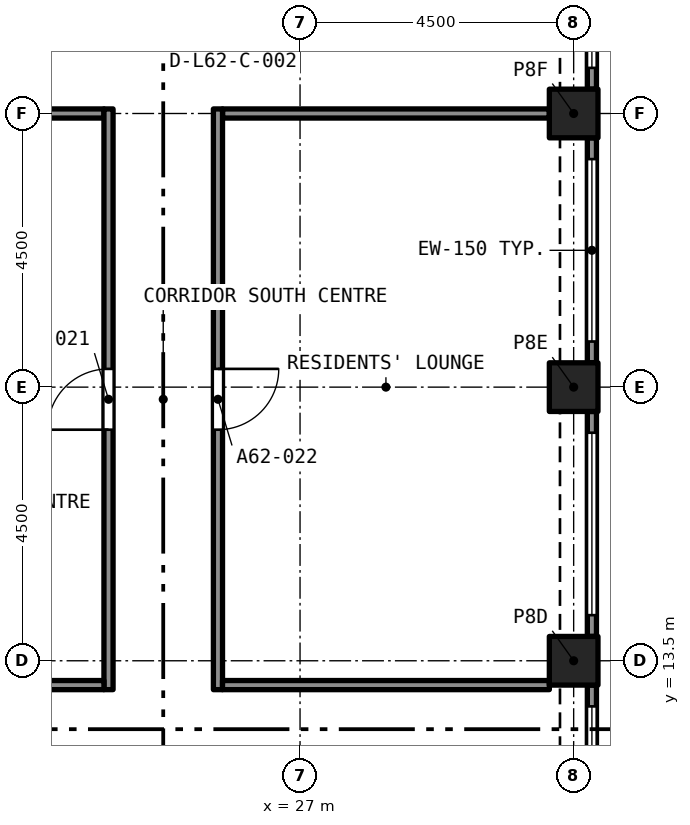
"""IFC4 building model, lengths in metres.
Left out: names, types, materials, properties, quantities, classifications, styles, units other than length and angle.
Written with IfcOpenShell. Run it as: python <this file> out.ifc"""

import sys

from ifc_helpers import new_model, si_unit, direction, frame, frame_2d, origin, origin_2d, place, context, subcontext, project, spatial, rectangle, extrude, element, fill, save


model = new_model("IFC4")
c1 = context("Model", 3, precision=1e-05, world=origin(), true_north=direction((0.0, 1.0)))
c2 = subcontext(c1, "Body", "Model", "MODEL_VIEW")
j1 = project(units=[si_unit("LENGTHUNIT", "METRE"), si_unit("PLANEANGLEUNIT", "RADIAN")], contexts=[c1])
p1 = place(None, origin())
s1 = spatial("IfcSite", under=j1, at=p1, CompositionType="ELEMENT")
p2 = place(p1, origin())
s2 = spatial("IfcBuilding", under=s1, at=p2, CompositionType="ELEMENT")
p3 = place(p2, frame((0.0, 0.0, 222.895)))
s3 = spatial("IfcBuildingStorey", under=s2, at=p3, CompositionType="ELEMENT", Elevation=222.895)
for number, where, z_axis, x_axis in (
    (1, (31.5, 13.5, 0.0), (0.0, 0.0, 1.0), (1.0, 0.0, 0.0)),
    (2, (31.5, 18.0, 0.0), (0.0, 0.0, 1.0), (1.0, 0.0, 0.0)),
    (3, (31.5, 22.5, 0.0), (0.0, 0.0, 1.0), (1.0, 0.0, 0.0)),
):
    element("IfcColumn", number, at=place(p3, frame(where, z_axis=z_axis, x_axis=x_axis)), inside=s3, PredefinedType="COLUMN", context=c2, shape_type="SweptSolid", body=[
        extrude(rectangle(XDim=0.8, YDim=0.8, at=origin_2d()), origin(), (0.0, 0.0, 1.0), 3.2),
    ])
p4 = place(p3, frame((31.8, 13.1, 0.0), z_axis=(0.0, 0.0, 1.0), x_axis=(0.0, -1.0, 0.0)))
e4 = element("IfcWall", 4, at=p4, inside=s3, PredefinedType="SOLIDWALL", context=c2, shape_type="SweptSolid", body=[
    extrude(rectangle(XDim=3.7, YDim=0.15, at=frame_2d((1.85, 0.0))), origin(), (0.0, 0.0, 1.0), 3.2),
])
p5 = place(p4, frame((0.35, 0.0, 0.45)))
e5 = element("IfcOpeningElement", 5, at=p5, cuts=e4, PredefinedType="OPENING", context=c2, shape_type="SweptSolid", body=[
    extrude(rectangle(XDim=3.0, YDim=1.95, at=frame_2d((1.5, 0.975))), frame((0.0, 0.085, 0.0), z_axis=(0.0, -1.0, 0.0), x_axis=(1.0, 0.0, 0.0)), (0.0, 0.0, 1.0), 0.17),
])
p6 = place(p3, frame((31.8, 17.6, 0.0), z_axis=(0.0, 0.0, 1.0), x_axis=(0.0, -1.0, 0.0)))
e6 = element("IfcWall", 6, at=p6, inside=s3, PredefinedType="SOLIDWALL", context=c2, shape_type="SweptSolid", body=[
    extrude(rectangle(XDim=3.7, YDim=0.15, at=frame_2d((1.85, 0.0))), origin(), (0.0, 0.0, 1.0), 3.2),
])
p7 = place(p6, frame((0.35, 0.0, 0.45)))
e7 = element("IfcOpeningElement", 7, at=p7, cuts=e6, PredefinedType="OPENING", context=c2, shape_type="SweptSolid", body=[
    extrude(rectangle(XDim=3.0, YDim=1.95, at=frame_2d((1.5, 0.975))), frame((0.0, 0.085, 0.0), z_axis=(0.0, -1.0, 0.0), x_axis=(1.0, 0.0, 0.0)), (0.0, 0.0, 1.0), 0.17),
])
p8 = place(p3, frame((31.8, 22.1, 0.0), z_axis=(0.0, 0.0, 1.0), x_axis=(0.0, -1.0, 0.0)))
e8 = element("IfcWall", 8, at=p8, inside=s3, PredefinedType="SOLIDWALL", context=c2, shape_type="SweptSolid", body=[
    extrude(rectangle(XDim=3.7, YDim=0.15, at=frame_2d((1.85, 0.0))), origin(), (0.0, 0.0, 1.0), 3.2),
])
p9 = place(p8, frame((0.35, 0.0, 0.45)))
e9 = element("IfcOpeningElement", 9, at=p9, cuts=e8, PredefinedType="OPENING", context=c2, shape_type="SweptSolid", body=[
    extrude(rectangle(XDim=3.0, YDim=1.95, at=frame_2d((1.5, 0.975))), frame((0.0, 0.085, 0.0), z_axis=(0.0, -1.0, 0.0), x_axis=(1.0, 0.0, 0.0)), (0.0, 0.0, 1.0), 0.17),
])
p10 = place(p3, frame((31.8, 26.6, 0.0), z_axis=(0.0, 0.0, 1.0), x_axis=(0.0, -1.0, 0.0)))
e10 = element("IfcWall", 10, at=p10, inside=s3, PredefinedType="SOLIDWALL", context=c2, shape_type="SweptSolid", body=[
    extrude(rectangle(XDim=3.7, YDim=0.15, at=frame_2d((1.85, 0.0))), origin(), (0.0, 0.0, 1.0), 3.2),
])
p11 = place(p10, frame((0.35, 0.0, 0.45)))
e11 = element("IfcOpeningElement", 11, at=p11, cuts=e10, PredefinedType="OPENING", context=c2, shape_type="SweptSolid", body=[
    extrude(rectangle(XDim=3.0, YDim=1.95, at=frame_2d((1.5, 0.975))), frame((0.0, 0.085, 0.0), z_axis=(0.0, -1.0, 0.0), x_axis=(1.0, 0.0, 0.0)), (0.0, 0.0, 1.0), 0.17),
])
for number, where, z_axis, x_axis in (
    (12, (18.4, 22.5, 0.0), (0.0, 0.0, 1.0), (1.0, 0.0, 0.0)),
    (13, (25.725, 22.5, 0.0), (0.0, 0.0, 1.0), (1.0, 0.0, 0.0)),
):
    element("IfcWall", number, at=place(p3, frame(where, z_axis=z_axis, x_axis=x_axis)), inside=s3, PredefinedType="PARTITIONING", context=c2, shape_type="SweptSolid", body=[
        extrude(rectangle(XDim=5.375, YDim=0.15, at=frame_2d((2.688, 0.0))), origin(), (0.0, 0.0, 1.0), 2.75),
    ])
p12 = place(p3, frame((23.85, 13.025, 0.0), z_axis=(0.0, 0.0, 1.0), x_axis=(0.0, 1.0, 0.0)))
e14 = element("IfcWall", 14, at=p12, inside=s3, PredefinedType="PARTITIONING", context=c2, shape_type="SweptSolid", body=[
    extrude(rectangle(XDim=9.55, YDim=0.15, at=frame_2d((4.775, 0.0))), origin(), (0.0, 0.0, 1.0), 2.75),
])
p13 = place(p12, frame((4.275, 0.0, 0.0)))
e15 = element("IfcOpeningElement", 15, at=p13, cuts=e14, PredefinedType="OPENING", context=c2, shape_type="SweptSolid", body=[
    extrude(rectangle(XDim=1.0, YDim=2.1, at=frame_2d((0.5, 1.05))), frame((0.0, 0.085, 0.0), z_axis=(0.0, -1.0, 0.0), x_axis=(1.0, 0.0, 0.0)), (0.0, 0.0, 1.0), 0.17),
])
p14 = place(p3, frame((25.65, 22.575, 0.0), z_axis=(0.0, 0.0, 1.0), x_axis=(0.0, -1.0, 0.0)))
e16 = element("IfcWall", 16, at=p14, inside=s3, PredefinedType="PARTITIONING", context=c2, shape_type="SweptSolid", body=[
    extrude(rectangle(XDim=9.55, YDim=0.15, at=frame_2d((4.775, 0.0))), origin(), (0.0, 0.0, 1.0), 2.75),
])
p15 = place(p14, frame((4.275, 0.0, 0.0)))
e17 = element("IfcOpeningElement", 17, at=p15, cuts=e16, PredefinedType="OPENING", context=c2, shape_type="SweptSolid", body=[
    extrude(rectangle(XDim=1.0, YDim=2.1, at=frame_2d((0.5, 1.05))), frame((0.0, 0.085, 0.0), z_axis=(0.0, -1.0, 0.0), x_axis=(1.0, 0.0, 0.0)), (0.0, 0.0, 1.0), 0.17),
])
for number, where, z_axis, x_axis in (
    (18, (18.4, 13.1, 0.0), (0.0, 0.0, 1.0), (1.0, 0.0, 0.0)),
    (19, (25.725, 13.1, 0.0), (0.0, 0.0, 1.0), (1.0, 0.0, 0.0)),
):
    element("IfcWall", number, at=place(p3, frame(where, z_axis=z_axis, x_axis=x_axis)), inside=s3, PredefinedType="PARTITIONING", context=c2, shape_type="SweptSolid", body=[
        extrude(rectangle(XDim=5.375, YDim=0.15, at=frame_2d((2.688, 0.0))), origin(), (0.0, 0.0, 1.0), 2.75),
    ])
p16 = place(p5, origin())
e20 = element("IfcWindow", 20, at=p16, inside=s3, PartitioningType="SINGLE_PANEL", PredefinedType="WINDOW", context=c2, shape_type="SweptSolid", body=[
    extrude(rectangle(XDim=3.0, YDim=1.95, at=frame_2d((1.5, 0.975))), frame((0.0, 0.03, 0.0), z_axis=(0.0, -1.0, 0.0), x_axis=(1.0, 0.0, 0.0)), (0.0, 0.0, 1.0), 0.06),
])
fill(e5, e20)
p17 = place(p7, origin())
e21 = element("IfcWindow", 21, at=p17, inside=s3, PartitioningType="SINGLE_PANEL", PredefinedType="WINDOW", context=c2, shape_type="SweptSolid", body=[
    extrude(rectangle(XDim=3.0, YDim=1.95, at=frame_2d((1.5, 0.975))), frame((0.0, 0.03, 0.0), z_axis=(0.0, -1.0, 0.0), x_axis=(1.0, 0.0, 0.0)), (0.0, 0.0, 1.0), 0.06),
])
fill(e7, e21)
p18 = place(p9, origin())
e22 = element("IfcWindow", 22, at=p18, inside=s3, PartitioningType="SINGLE_PANEL", PredefinedType="WINDOW", context=c2, shape_type="SweptSolid", body=[
    extrude(rectangle(XDim=3.0, YDim=1.95, at=frame_2d((1.5, 0.975))), frame((0.0, 0.03, 0.0), z_axis=(0.0, -1.0, 0.0), x_axis=(1.0, 0.0, 0.0)), (0.0, 0.0, 1.0), 0.06),
])
fill(e9, e22)
p19 = place(p11, origin())
e23 = element("IfcWindow", 23, at=p19, inside=s3, PartitioningType="SINGLE_PANEL", PredefinedType="WINDOW", context=c2, shape_type="SweptSolid", body=[
    extrude(rectangle(XDim=3.0, YDim=1.95, at=frame_2d((1.5, 0.975))), frame((0.0, 0.03, 0.0), z_axis=(0.0, -1.0, 0.0), x_axis=(1.0, 0.0, 0.0)), (0.0, 0.0, 1.0), 0.06),
])
fill(e11, e23)
p20 = place(p13, origin())
e24 = element("IfcDoor", 24, at=p20, inside=s3, OperationType="SINGLE_SWING_RIGHT", PredefinedType="DOOR", context=c2, shape_type="SweptSolid", body=[
    extrude(rectangle(XDim=1.0, YDim=2.1, at=frame_2d((0.5, 1.05))), frame((0.0, 0.025, 0.0), z_axis=(0.0, -1.0, 0.0), x_axis=(1.0, 0.0, 0.0)), (0.0, 0.0, 1.0), 0.05),
])
fill(e15, e24)
p21 = place(p15, origin())
e25 = element("IfcDoor", 25, at=p21, inside=s3, OperationType="SINGLE_SWING_LEFT", PredefinedType="DOOR", context=c2, shape_type="SweptSolid", body=[
    extrude(rectangle(XDim=1.0, YDim=2.1, at=frame_2d((0.5, 1.05))), frame((0.0, 0.025, 0.0), z_axis=(0.0, -1.0, 0.0), x_axis=(1.0, 0.0, 0.0)), (0.0, 0.0, 1.0), 0.05),
])
fill(e17, e25)
save(model, sys.argv[1])
